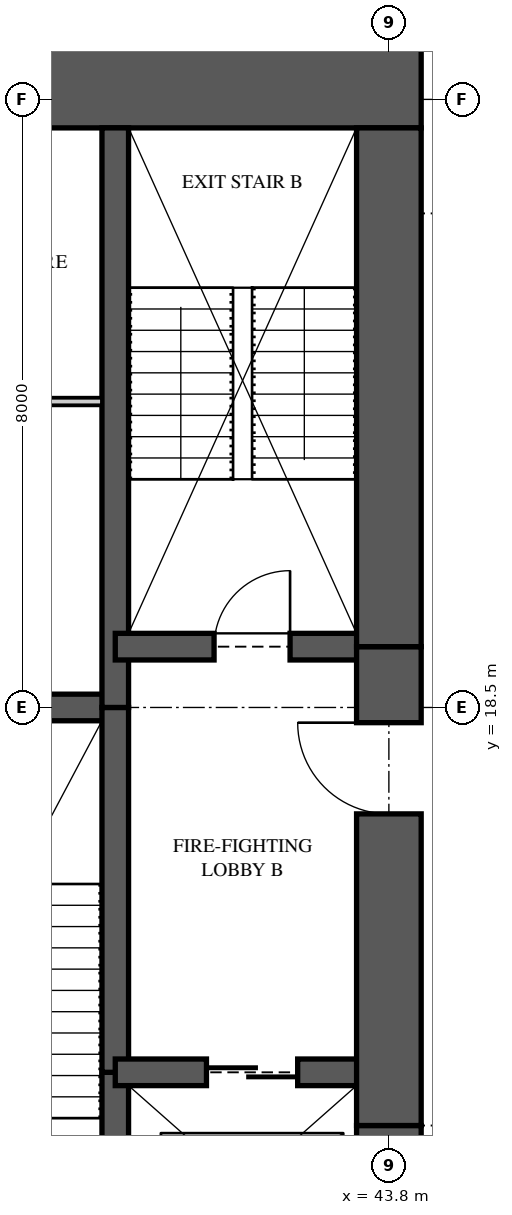
"""IFC4 building model, lengths in metres.
Left out: names, types, materials, properties, quantities, classifications, styles, units other than length and angle.
Written with IfcOpenShell. Run it as: python <this file> out.ifc"""

import sys

from ifc_helpers import new_model, si_unit, direction, frame, frame_2d, origin, place, context, subcontext, project, spatial, rectangle, extrude, element, fill, save


model = new_model("IFC4")
c1 = context("Model", 3, precision=1e-05, world=origin(), true_north=direction((0.0, 1.0)))
c2 = subcontext(c1, "Body", "Model", "MODEL_VIEW")
j1 = project(units=[si_unit("LENGTHUNIT", "METRE"), si_unit("PLANEANGLEUNIT", "RADIAN")], contexts=[c1])
p1 = place(None, origin())
s1 = spatial("IfcSite", under=j1, at=p1, CompositionType="ELEMENT")
p2 = place(p1, origin())
s2 = spatial("IfcBuilding", under=s1, at=p2, CompositionType="ELEMENT")
p3 = place(p2, frame((0.0, 0.0, 101.5)))
s3 = spatial("IfcBuildingStorey", under=s2, at=p3, CompositionType="ELEMENT", Elevation=101.5)
p4 = place(p3, frame((44.225, 26.875, 0.0), z_axis=(0.0, 0.0, 1.0), x_axis=(-1.0, 0.0, 0.0)))
e1 = element("IfcWall", 1, at=p4, inside=s3, PredefinedType="SHEAR", context=c2, shape_type="SweptSolid", body=[
    extrude(rectangle(XDim=8.325, YDim=1.5, at=frame_2d((4.163, 0.0))), origin(), (0.0, 0.0, 1.0), 3.35),
])
p5 = place(p4, frame((5.725, 0.0, 0.0)))
e2 = element("IfcOpeningElement", 2, at=p5, cuts=e1, PredefinedType="OPENING", context=c2, shape_type="SweptSolid", body=[
    extrude(rectangle(XDim=0.9, YDim=2.1, at=frame_2d((0.45, 1.05))), frame((0.0, 0.76, 0.0), z_axis=(0.0, -1.0, 0.0), x_axis=(1.0, 0.0, 0.0)), (0.0, 0.0, 1.0), 1.52),
])
p6 = place(p3, frame((43.8, 10.875, 0.0), z_axis=(0.0, 0.0, 1.0), x_axis=(0.0, 1.0, 0.0)))
e3 = element("IfcWall", 3, at=p6, inside=s3, PredefinedType="SHEAR", context=c2, shape_type="SweptSolid", body=[
    extrude(rectangle(XDim=2.125, YDim=0.85, at=frame_2d((1.062, 0.0))), origin(), (0.0, 0.0, 1.0), 3.35),
])
p7 = place(p3, frame((43.8, 13.0, 0.0), z_axis=(0.0, 0.0, 1.0), x_axis=(0.0, 1.0, 0.0)))
e4 = element("IfcWall", 4, at=p7, inside=s3, PredefinedType="SHEAR", context=c2, shape_type="SweptSolid", body=[
    extrude(rectangle(XDim=6.3, YDim=0.85, at=frame_2d((3.15, 0.0))), origin(), (0.0, 0.0, 1.0), 3.35),
])
p8 = place(p7, frame((4.1, 0.0, 0.0)))
e5 = element("IfcOpeningElement", 5, at=p8, cuts=e4, PredefinedType="OPENING", context=c2, shape_type="SweptSolid", body=[
    extrude(rectangle(XDim=1.2, YDim=2.2, at=frame_2d((0.6, 1.1))), frame((0.0, 0.435, 0.0), z_axis=(0.0, -1.0, 0.0), x_axis=(1.0, 0.0, 0.0)), (0.0, 0.0, 1.0), 0.87),
])
p9 = place(p3, frame((43.8, 19.3, 0.0), z_axis=(0.0, 0.0, 1.0), x_axis=(0.0, 1.0, 0.0)))
e6 = element("IfcWall", 6, at=p9, inside=s3, PredefinedType="SHEAR", context=c2, shape_type="SweptSolid", body=[
    extrude(rectangle(XDim=6.825, YDim=0.85, at=frame_2d((3.413, 0.0))), origin(), (0.0, 0.0, 1.0), 3.35),
])
p10 = place(p3, frame((40.2, 10.875, 0.0), z_axis=(0.0, 0.0, 1.0), x_axis=(0.0, 1.0, 0.0)))
e7 = element("IfcWall", 7, at=p10, inside=s3, PredefinedType="SHEAR", context=c2, shape_type="SweptSolid", body=[
    extrude(rectangle(XDim=2.825, YDim=0.35, at=frame_2d((1.413, 0.0))), origin(), (0.0, 0.0, 1.0), 3.35),
])
p11 = place(p3, frame((40.2, 13.7, 0.0), z_axis=(0.0, 0.0, 1.0), x_axis=(0.0, 1.0, 0.0)))
e8 = element("IfcWall", 8, at=p11, inside=s3, PredefinedType="SHEAR", context=c2, shape_type="SweptSolid", body=[
    extrude(rectangle(XDim=4.8, YDim=0.35, at=frame_2d((2.4, 0.0))), origin(), (0.0, 0.0, 1.0), 3.35),
])
p12 = place(p3, frame((40.2, 18.5, 0.0), z_axis=(0.0, 0.0, 1.0), x_axis=(0.0, 1.0, 0.0)))
e9 = element("IfcWall", 9, at=p12, inside=s3, PredefinedType="SHEAR", context=c2, shape_type="SweptSolid", body=[
    extrude(rectangle(XDim=7.625, YDim=0.35, at=frame_2d((3.812, 0.0))), origin(), (0.0, 0.0, 1.0), 3.35),
])
p13 = place(p3, frame((35.9, 18.5, 0.0), z_axis=(0.0, 0.0, 1.0), x_axis=(1.0, 0.0, 0.0)))
e10 = element("IfcWall", 10, at=p13, inside=s3, PredefinedType="SHEAR", context=c2, shape_type="SweptSolid", body=[
    extrude(rectangle(XDim=4.3, YDim=0.35, at=frame_2d((2.15, 0.0))), origin(), (0.0, 0.0, 1.0), 3.35),
])
p14 = place(p3, frame((40.2, 13.7, 0.0), z_axis=(0.0, 0.0, 1.0), x_axis=(1.0, 0.0, 0.0)))
e11 = element("IfcWall", 11, at=p14, inside=s3, PredefinedType="SHEAR", context=c2, shape_type="SweptSolid", body=[
    extrude(rectangle(XDim=3.6, YDim=0.35, at=frame_2d((1.8, 0.0))), origin(), (0.0, 0.0, 1.0), 3.35),
])
p15 = place(p14, frame((1.2, 0.0, 0.0)))
e12 = element("IfcOpeningElement", 12, at=p15, cuts=e11, PredefinedType="OPENING", context=c2, shape_type="SweptSolid", body=[
    extrude(rectangle(XDim=1.2, YDim=2.1, at=frame_2d((0.6, 1.05))), frame((0.0, 0.185, 0.0), z_axis=(0.0, -1.0, 0.0), x_axis=(1.0, 0.0, 0.0)), (0.0, 0.0, 1.0), 0.37),
])
p16 = place(p3, frame((40.2, 19.3, 0.0), z_axis=(0.0, 0.0, 1.0), x_axis=(1.0, 0.0, 0.0)))
e13 = element("IfcWall", 13, at=p16, inside=s3, PredefinedType="SHEAR", context=c2, shape_type="SweptSolid", body=[
    extrude(rectangle(XDim=3.6, YDim=0.35, at=frame_2d((1.8, 0.0))), origin(), (0.0, 0.0, 1.0), 3.35),
])
p17 = place(p16, frame((1.3, 0.0, 0.0)))
e14 = element("IfcOpeningElement", 14, at=p17, cuts=e13, PredefinedType="OPENING", context=c2, shape_type="SweptSolid", body=[
    extrude(rectangle(XDim=1.0, YDim=2.1, at=frame_2d((0.5, 1.05))), frame((0.0, 0.185, 0.0), z_axis=(0.0, -1.0, 0.0), x_axis=(1.0, 0.0, 0.0)), (0.0, 0.0, 1.0), 0.37),
])
p18 = place(p3, frame((36.075, 22.525, 0.0), z_axis=(0.0, 0.0, 1.0), x_axis=(1.0, 0.0, 0.0)))
e15 = element("IfcWall", 15, at=p18, inside=s3, PredefinedType="PARTITIONING", context=c2, shape_type="SweptSolid", body=[
    extrude(rectangle(XDim=3.95, YDim=0.1, at=frame_2d((1.975, 0.0))), origin(), (0.0, 0.0, 1.0), 3.11),
])
p19 = place(p18, frame((1.525, 0.0, 0.0)))
e16 = element("IfcOpeningElement", 16, at=p19, cuts=e15, PredefinedType="OPENING", context=c2, shape_type="SweptSolid", body=[
    extrude(rectangle(XDim=0.9, YDim=2.1, at=frame_2d((0.45, 1.05))), frame((0.0, 0.06, 0.0), z_axis=(0.0, -1.0, 0.0), x_axis=(1.0, 0.0, 0.0)), (0.0, 0.0, 1.0), 0.12),
])
p20 = place(p17, origin())
e17 = element("IfcDoor", 17, at=p20, inside=s3, OperationType="SINGLE_SWING_RIGHT", PredefinedType="DOOR", context=c2, shape_type="SweptSolid", body=[
    extrude(rectangle(XDim=1.0, YDim=2.1, at=frame_2d((0.5, 1.05))), frame((0.0, 0.025, 0.0), z_axis=(0.0, -1.0, 0.0), x_axis=(1.0, 0.0, 0.0)), (0.0, 0.0, 1.0), 0.05),
])
fill(e14, e17)
p21 = place(p8, origin())
e18 = element("IfcDoor", 18, at=p21, inside=s3, OperationType="SINGLE_SWING_RIGHT", PredefinedType="DOOR", context=c2, shape_type="SweptSolid", body=[
    extrude(rectangle(XDim=1.2, YDim=2.2, at=frame_2d((0.6, 1.1))), frame((0.0, 0.025, 0.0), z_axis=(0.0, -1.0, 0.0), x_axis=(1.0, 0.0, 0.0)), (0.0, 0.0, 1.0), 0.05),
])
fill(e5, e18)
p22 = place(p15, origin())
e19 = element("IfcDoor", 19, at=p22, inside=s3, OperationType="SLIDING_TO_LEFT", PredefinedType="DOOR", context=c2, shape_type="SweptSolid", body=[
    extrude(rectangle(XDim=1.2, YDim=2.1, at=frame_2d((0.6, 1.05))), frame((0.0, 0.025, 0.0), z_axis=(0.0, -1.0, 0.0), x_axis=(1.0, 0.0, 0.0)), (0.0, 0.0, 1.0), 0.05),
])
fill(e12, e19)
save(model, sys.argv[1])
